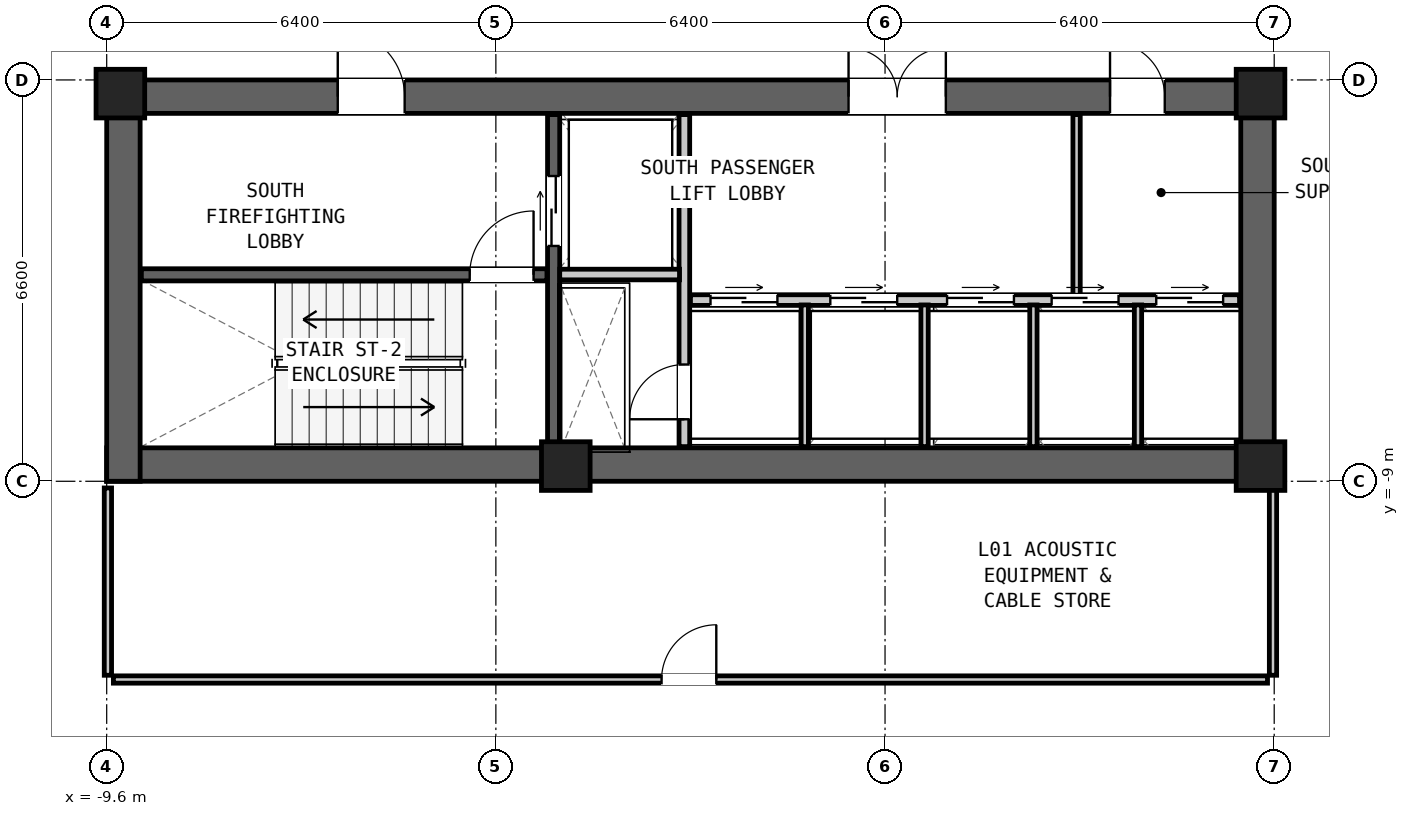
"""IFC4 building model, lengths in metres.
Left out: names, types, materials, properties, quantities, classifications, styles, units other than length and angle.
Written with IfcOpenShell. Run it as: python <this file> out.ifc"""

import sys

from ifc_helpers import new_model, si_unit, direction, frame, frame_2d, origin, origin_2d, place, context, subcontext, project, spatial, rectangle, extrude, element, fill, save


model = new_model("IFC4")
c1 = context("Model", 3, precision=1e-05, world=origin(), true_north=direction((0.0, 1.0)))
c2 = subcontext(c1, "Body", "Model", "MODEL_VIEW")
j1 = project(units=[si_unit("LENGTHUNIT", "METRE"), si_unit("PLANEANGLEUNIT", "RADIAN")], contexts=[c1])
p1 = place(None, origin())
s1 = spatial("IfcSite", under=j1, at=p1, CompositionType="ELEMENT")
p2 = place(p1, origin())
s2 = spatial("IfcBuilding", under=s1, at=p2, CompositionType="ELEMENT")
p3 = place(p2, frame((0.0, 0.0, 5.1)))
s3 = spatial("IfcBuildingStorey", under=s2, at=p3, CompositionType="ELEMENT", Elevation=5.1)
p4 = place(p3, frame((-9.6, -8.725, 0.0), z_axis=(0.0, 0.0, 1.0), x_axis=(1.0, 0.0, 0.0)))
e1 = element("IfcWall", 1, at=p4, inside=s3, PredefinedType="SHEAR", context=c2, shape_type="SweptSolid", body=[
    extrude(rectangle(XDim=19.2, YDim=0.55, at=frame_2d((9.6, 0.0))), origin(), (0.0, 0.0, 1.0), 4.2),
])
p5 = place(p3, frame((-9.6, -2.675, 0.0), z_axis=(0.0, 0.0, 1.0), x_axis=(1.0, 0.0, 0.0)))
e2 = element("IfcWall", 2, at=p5, inside=s3, PredefinedType="SHEAR", context=c2, shape_type="SweptSolid", body=[
    extrude(rectangle(XDim=19.2, YDim=0.55, at=frame_2d((9.6, 0.0))), origin(), (0.0, 0.0, 1.0), 4.2),
])
p6 = place(p5, frame((3.8, 0.0, 0.0)))
e3 = element("IfcOpeningElement", 3, at=p6, cuts=e2, PredefinedType="OPENING", context=c2, shape_type="SweptSolid", body=[
    extrude(rectangle(XDim=1.1, YDim=2.08, at=frame_2d((0.55, 1.04))), frame((0.0, 0.287, 0.0), z_axis=(0.0, -1.0, 0.0), x_axis=(1.0, 0.0, 0.0)), (0.0, 0.0, 1.0), 0.574),
])
p7 = place(p5, frame((12.2, 0.0, 0.0)))
e4 = element("IfcOpeningElement", 4, at=p7, cuts=e2, PredefinedType="OPENING", context=c2, shape_type="SweptSolid", body=[
    extrude(rectangle(XDim=1.6, YDim=2.12, at=frame_2d((0.8, 1.06))), frame((0.0, 0.287, 0.0), z_axis=(0.0, -1.0, 0.0), x_axis=(1.0, 0.0, 0.0)), (0.0, 0.0, 1.0), 0.574),
])
p8 = place(p5, frame((16.5, 0.0, 0.0)))
e5 = element("IfcOpeningElement", 5, at=p8, cuts=e2, PredefinedType="OPENING", context=c2, shape_type="SweptSolid", body=[
    extrude(rectangle(XDim=0.9, YDim=2.05, at=frame_2d((0.45, 1.025))), frame((0.0, 0.287, 0.0), z_axis=(0.0, -1.0, 0.0), x_axis=(1.0, 0.0, 0.0)), (0.0, 0.0, 1.0), 0.574),
])
for number, where, z_axis, x_axis in (
    (6, (-9.325, -9.0, 0.0), (0.0, 0.0, 1.0), (0.0, 1.0, 0.0)),
    (7, (9.325, -9.0, 0.0), (0.0, 0.0, 1.0), (0.0, 1.0, 0.0)),
):
    element("IfcWall", number, at=place(p3, frame(where, z_axis=z_axis, x_axis=x_axis)), inside=s3, PredefinedType="SHEAR", context=c2, shape_type="SweptSolid", body=[
        extrude(rectangle(XDim=6.6, YDim=0.55, at=frame_2d((3.3, 0.0))), origin(), (0.0, 0.0, 1.0), 4.2),
    ])
for number, where, z_axis, x_axis in (
    (8, (-9.375, -2.625, 0.0), (0.0, 0.0, 1.0), (1.0, 0.0, 0.0)),
    (9, (9.375, -2.625, 0.0), (0.0, 0.0, 1.0), (1.0, 0.0, 0.0)),
    (10, (-2.05, -8.75, 0.0), (0.0, 0.0, 1.0), (1.0, 0.0, 0.0)),
    (11, (9.375, -8.75, 0.0), (0.0, 0.0, 1.0), (1.0, 0.0, 0.0)),
):
    element("IfcColumn", number, at=place(p3, frame(where, z_axis=z_axis, x_axis=x_axis)), inside=s3, PredefinedType="COLUMN", context=c2, shape_type="SweptSolid", body=[
        extrude(rectangle(XDim=0.8, YDim=0.8, at=origin_2d()), origin(), (0.0, 0.0, 1.0), 4.2),
    ])
p9 = place(p3, frame((-9.03, -5.605, 0.0), z_axis=(0.0, 0.0, 1.0), x_axis=(1.0, 0.0, 0.0)))
e12 = element("IfcWall", 12, at=p9, inside=s3, PredefinedType="SHEAR", context=c2, shape_type="SweptSolid", body=[
    extrude(rectangle(XDim=6.67, YDim=0.2, at=frame_2d((3.335, 0.0))), origin(), (0.0, 0.0, 1.0), 3.88),
])
p10 = place(p9, frame((5.4, 0.0, 0.0)))
e13 = element("IfcOpeningElement", 13, at=p10, cuts=e12, PredefinedType="OPENING", context=c2, shape_type="SweptSolid", body=[
    extrude(rectangle(XDim=1.05, YDim=2.08, at=frame_2d((0.525, 1.04))), frame((0.0, 0.112, 0.0), z_axis=(0.0, -1.0, 0.0), x_axis=(1.0, 0.0, 0.0)), (0.0, 0.0, 1.0), 0.224),
])
p11 = place(p3, frame((-2.25, -8.43, 0.0), z_axis=(0.0, 0.0, 1.0), x_axis=(0.0, 1.0, 0.0)))
e14 = element("IfcWall", 14, at=p11, inside=s3, PredefinedType="SHEAR", context=c2, shape_type="SweptSolid", body=[
    extrude(rectangle(XDim=5.46, YDim=0.2, at=frame_2d((2.73, 0.0))), origin(), (0.0, 0.0, 1.0), 3.88),
])
p12 = place(p11, frame((3.3, 0.0, 0.0)))
e15 = element("IfcOpeningElement", 15, at=p12, cuts=e14, PredefinedType="OPENING", context=c2, shape_type="SweptSolid", body=[
    extrude(rectangle(XDim=1.15, YDim=2.08, at=frame_2d((0.575, 1.04))), frame((0.0, 0.112, 0.0), z_axis=(0.0, -1.0, 0.0), x_axis=(1.0, 0.0, 0.0)), (0.0, 0.0, 1.0), 0.224),
])
p13 = place(p3, frame((-0.1, -8.43, 0.0), z_axis=(0.0, 0.0, 1.0), x_axis=(0.0, 1.0, 0.0)))
e16 = element("IfcWall", 16, at=p13, inside=s3, PredefinedType="PARTITIONING", context=c2, shape_type="SweptSolid", body=[
    extrude(rectangle(XDim=5.46, YDim=0.175, at=frame_2d((2.73, 0.0))), origin(), (0.0, 0.0, 1.0), 3.88),
])
p14 = place(p13, frame((0.45, 0.0, 0.0)))
e17 = element("IfcOpeningElement", 17, at=p14, cuts=e16, PredefinedType="OPENING", context=c2, shape_type="SweptSolid", body=[
    extrude(rectangle(XDim=0.9, YDim=2.05, at=frame_2d((0.45, 1.025))), frame((0.0, 0.1, 0.0), z_axis=(0.0, -1.0, 0.0), x_axis=(1.0, 0.0, 0.0)), (0.0, 0.0, 1.0), 0.199),
])
p15 = place(p3, frame((-2.15, -5.6, 0.0), z_axis=(0.0, 0.0, 1.0), x_axis=(1.0, 0.0, 0.0)))
e18 = element("IfcWall", 18, at=p15, inside=s3, PredefinedType="PARTITIONING", context=c2, shape_type="SweptSolid", body=[
    extrude(rectangle(XDim=1.97, YDim=0.175, at=frame_2d((0.985, 0.0))), origin(), (0.0, 0.0, 1.0), 3.88),
])
p16 = place(p3, frame((0.0, -6.02, 0.0), z_axis=(0.0, 0.0, 1.0), x_axis=(1.0, 0.0, 0.0)))
e19 = element("IfcWall", 19, at=p16, inside=s3, PredefinedType="PARTITIONING", context=c2, shape_type="SweptSolid", body=[
    extrude(rectangle(XDim=9.03, YDim=0.175, at=frame_2d((4.515, 0.0))), origin(), (0.0, 0.0, 1.0), 3.88),
])
p17 = place(p16, frame((0.33, 0.0, 0.0)))
e20 = element("IfcOpeningElement", 20, at=p17, cuts=e19, PredefinedType="OPENING", context=c2, shape_type="SweptSolid", body=[
    extrude(rectangle(XDim=1.1, YDim=2.06, at=frame_2d((0.55, 1.03))), frame((0.0, 0.1, 0.0), z_axis=(0.0, -1.0, 0.0), x_axis=(1.0, 0.0, 0.0)), (0.0, 0.0, 1.0), 0.199),
])
p18 = place(p16, frame((2.3, 0.0, 0.0)))
e21 = element("IfcOpeningElement", 21, at=p18, cuts=e19, PredefinedType="OPENING", context=c2, shape_type="SweptSolid", body=[
    extrude(rectangle(XDim=1.1, YDim=2.06, at=frame_2d((0.55, 1.03))), frame((0.0, 0.1, 0.0), z_axis=(0.0, -1.0, 0.0), x_axis=(1.0, 0.0, 0.0)), (0.0, 0.0, 1.0), 0.199),
])
p19 = place(p16, frame((4.22, 0.0, 0.0)))
e22 = element("IfcOpeningElement", 22, at=p19, cuts=e19, PredefinedType="OPENING", context=c2, shape_type="SweptSolid", body=[
    extrude(rectangle(XDim=1.1, YDim=2.06, at=frame_2d((0.55, 1.03))), frame((0.0, 0.1, 0.0), z_axis=(0.0, -1.0, 0.0), x_axis=(1.0, 0.0, 0.0)), (0.0, 0.0, 1.0), 0.199),
])
p20 = place(p16, frame((5.94, 0.0, 0.0)))
e23 = element("IfcOpeningElement", 23, at=p20, cuts=e19, PredefinedType="OPENING", context=c2, shape_type="SweptSolid", body=[
    extrude(rectangle(XDim=1.1, YDim=2.06, at=frame_2d((0.55, 1.03))), frame((0.0, 0.1, 0.0), z_axis=(0.0, -1.0, 0.0), x_axis=(1.0, 0.0, 0.0)), (0.0, 0.0, 1.0), 0.199),
])
p21 = place(p16, frame((7.66, 0.0, 0.0)))
e24 = element("IfcOpeningElement", 24, at=p21, cuts=e19, PredefinedType="OPENING", context=c2, shape_type="SweptSolid", body=[
    extrude(rectangle(XDim=1.1, YDim=2.06, at=frame_2d((0.55, 1.03))), frame((0.0, 0.1, 0.0), z_axis=(0.0, -1.0, 0.0), x_axis=(1.0, 0.0, 0.0)), (0.0, 0.0, 1.0), 0.199),
])
for number, where, z_axis, x_axis in (
    (25, (1.88, -8.43, 0.0), (0.0, 0.0, 1.0), (0.0, 1.0, 0.0)),
    (26, (3.85, -8.43, 0.0), (0.0, 0.0, 1.0), (0.0, 1.0, 0.0)),
    (27, (5.64, -8.43, 0.0), (0.0, 0.0, 1.0), (0.0, 1.0, 0.0)),
    (28, (7.36, -8.43, 0.0), (0.0, 0.0, 1.0), (0.0, 1.0, 0.0)),
):
    element("IfcWall", number, at=place(p3, frame(where, z_axis=z_axis, x_axis=x_axis)), inside=s3, PredefinedType="PARTITIONING", context=c2, shape_type="SweptSolid", body=[
        extrude(rectangle(XDim=2.33, YDim=0.12, at=frame_2d((1.165, 0.0))), origin(), (0.0, 0.0, 1.0), 3.88),
    ])
p22 = place(p3, frame((6.35, -5.94, 0.0), z_axis=(0.0, 0.0, 1.0), x_axis=(0.0, 1.0, 0.0)))
e29 = element("IfcWall", 29, at=p22, inside=s3, PredefinedType="PARTITIONING", context=c2, shape_type="SweptSolid", body=[
    extrude(rectangle(XDim=2.97, YDim=0.12, at=frame_2d((1.485, 0.0))), origin(), (0.0, 0.0, 1.0), 3.88),
])
p23 = place(p3, frame((-9.49, -12.26, 0.0), z_axis=(0.0, 0.0, 1.0), x_axis=(1.0, 0.0, 0.0)))
e30 = element("IfcWall", 30, at=p23, inside=s3, PredefinedType="PARTITIONING", context=c2, shape_type="SweptSolid", body=[
    extrude(rectangle(XDim=18.98, YDim=0.12, at=frame_2d((9.49, 0.0))), origin(), (0.0, 0.0, 1.0), 3.88),
])
p24 = place(p23, frame((9.015, 0.0, 0.0)))
e31 = element("IfcOpeningElement", 31, at=p24, cuts=e30, PredefinedType="OPENING", context=c2, shape_type="SweptSolid", body=[
    extrude(rectangle(XDim=0.9, YDim=2.05, at=frame_2d((0.45, 1.025))), frame((0.0, 0.072, 0.0), z_axis=(0.0, -1.0, 0.0), x_axis=(1.0, 0.0, 0.0)), (0.0, 0.0, 1.0), 0.144),
])
for number, where, z_axis, x_axis in (
    (32, (-9.58, -12.19, 0.0), (0.0, 0.0, 1.0), (0.0, 1.0, 0.0)),
    (33, (9.58, -12.19, 0.0), (0.0, 0.0, 1.0), (0.0, 1.0, 0.0)),
):
    element("IfcWall", number, at=place(p3, frame(where, z_axis=z_axis, x_axis=x_axis)), inside=s3, PredefinedType="PARTITIONING", context=c2, shape_type="SweptSolid", body=[
        extrude(rectangle(XDim=3.08, YDim=0.12, at=frame_2d((1.54, 0.0))), origin(), (0.0, 0.0, 1.0), 3.88),
    ])
p25 = place(p10, origin())
e34 = element("IfcDoor", 34, at=p25, inside=s3, OperationType="SINGLE_SWING_RIGHT", PredefinedType="DOOR", context=c2, shape_type="SweptSolid", body=[
    extrude(rectangle(XDim=1.05, YDim=2.08, at=frame_2d((0.525, 1.04))), frame((0.0, 0.025, 0.0), z_axis=(0.0, -1.0, 0.0), x_axis=(1.0, 0.0, 0.0)), (0.0, 0.0, 1.0), 0.05),
])
fill(e13, e34)
p26 = place(p6, origin())
e35 = element("IfcDoor", 35, at=p26, inside=s3, OperationType="SINGLE_SWING_LEFT", PredefinedType="DOOR", context=c2, shape_type="SweptSolid", body=[
    extrude(rectangle(XDim=1.1, YDim=2.08, at=frame_2d((0.55, 1.04))), frame((0.0, 0.025, 0.0), z_axis=(0.0, -1.0, 0.0), x_axis=(1.0, 0.0, 0.0)), (0.0, 0.0, 1.0), 0.05),
])
fill(e3, e35)
p27 = place(p12, origin())
e36 = element("IfcDoor", 36, at=p27, inside=s3, OperationType="DOUBLE_DOOR_SLIDING", PredefinedType="DOOR", context=c2, shape_type="SweptSolid", body=[
    extrude(rectangle(XDim=1.15, YDim=2.08, at=frame_2d((0.575, 1.04))), frame((0.0, 0.025, 0.0), z_axis=(0.0, -1.0, 0.0), x_axis=(1.0, 0.0, 0.0)), (0.0, 0.0, 1.0), 0.05),
])
fill(e15, e36)
p28 = place(p14, origin())
e37 = element("IfcDoor", 37, at=p28, inside=s3, OperationType="SINGLE_SWING_LEFT", PredefinedType="DOOR", context=c2, shape_type="SweptSolid", body=[
    extrude(rectangle(XDim=0.9, YDim=2.05, at=frame_2d((0.45, 1.025))), frame((0.0, 0.025, 0.0), z_axis=(0.0, -1.0, 0.0), x_axis=(1.0, 0.0, 0.0)), (0.0, 0.0, 1.0), 0.05),
])
fill(e17, e37)
p29 = place(p7, origin())
e38 = element("IfcDoor", 38, at=p29, inside=s3, OperationType="DOUBLE_DOOR_SINGLE_SWING", PredefinedType="DOOR", context=c2, shape_type="SweptSolid", body=[
    extrude(rectangle(XDim=1.6, YDim=2.12, at=frame_2d((0.8, 1.06))), frame((0.0, 0.025, 0.0), z_axis=(0.0, -1.0, 0.0), x_axis=(1.0, 0.0, 0.0)), (0.0, 0.0, 1.0), 0.05),
])
fill(e4, e38)
p30 = place(p8, origin())
e39 = element("IfcDoor", 39, at=p30, inside=s3, OperationType="SINGLE_SWING_LEFT", PredefinedType="DOOR", context=c2, shape_type="SweptSolid", body=[
    extrude(rectangle(XDim=0.9, YDim=2.05, at=frame_2d((0.45, 1.025))), frame((0.0, 0.025, 0.0), z_axis=(0.0, -1.0, 0.0), x_axis=(1.0, 0.0, 0.0)), (0.0, 0.0, 1.0), 0.05),
])
fill(e5, e39)
p31 = place(p24, origin())
e40 = element("IfcDoor", 40, at=p31, inside=s3, OperationType="SINGLE_SWING_RIGHT", PredefinedType="DOOR", context=c2, shape_type="SweptSolid", body=[
    extrude(rectangle(XDim=0.9, YDim=2.05, at=frame_2d((0.45, 1.025))), frame((0.0, 0.025, 0.0), z_axis=(0.0, -1.0, 0.0), x_axis=(1.0, 0.0, 0.0)), (0.0, 0.0, 1.0), 0.05),
])
fill(e31, e40)
p32 = place(p17, origin())
e41 = element("IfcDoor", 41, at=p32, inside=s3, OperationType="DOUBLE_DOOR_SLIDING", PredefinedType="DOOR", context=c2, shape_type="SweptSolid", body=[
    extrude(rectangle(XDim=1.1, YDim=2.06, at=frame_2d((0.55, 1.03))), frame((0.0, 0.025, 0.0), z_axis=(0.0, -1.0, 0.0), x_axis=(1.0, 0.0, 0.0)), (0.0, 0.0, 1.0), 0.05),
])
fill(e20, e41)
p33 = place(p18, origin())
e42 = element("IfcDoor", 42, at=p33, inside=s3, OperationType="DOUBLE_DOOR_SLIDING", PredefinedType="DOOR", context=c2, shape_type="SweptSolid", body=[
    extrude(rectangle(XDim=1.1, YDim=2.06, at=frame_2d((0.55, 1.03))), frame((0.0, 0.025, 0.0), z_axis=(0.0, -1.0, 0.0), x_axis=(1.0, 0.0, 0.0)), (0.0, 0.0, 1.0), 0.05),
])
fill(e21, e42)
p34 = place(p19, origin())
e43 = element("IfcDoor", 43, at=p34, inside=s3, OperationType="DOUBLE_DOOR_SLIDING", PredefinedType="DOOR", context=c2, shape_type="SweptSolid", body=[
    extrude(rectangle(XDim=1.1, YDim=2.06, at=frame_2d((0.55, 1.03))), frame((0.0, 0.025, 0.0), z_axis=(0.0, -1.0, 0.0), x_axis=(1.0, 0.0, 0.0)), (0.0, 0.0, 1.0), 0.05),
])
fill(e22, e43)
p35 = place(p20, origin())
e44 = element("IfcDoor", 44, at=p35, inside=s3, OperationType="DOUBLE_DOOR_SLIDING", PredefinedType="DOOR", context=c2, shape_type="SweptSolid", body=[
    extrude(rectangle(XDim=1.1, YDim=2.06, at=frame_2d((0.55, 1.03))), frame((0.0, 0.025, 0.0), z_axis=(0.0, -1.0, 0.0), x_axis=(1.0, 0.0, 0.0)), (0.0, 0.0, 1.0), 0.05),
])
fill(e23, e44)
p36 = place(p21, origin())
e45 = element("IfcDoor", 45, at=p36, inside=s3, OperationType="DOUBLE_DOOR_SLIDING", PredefinedType="DOOR", context=c2, shape_type="SweptSolid", body=[
    extrude(rectangle(XDim=1.1, YDim=2.06, at=frame_2d((0.55, 1.03))), frame((0.0, 0.025, 0.0), z_axis=(0.0, -1.0, 0.0), x_axis=(1.0, 0.0, 0.0)), (0.0, 0.0, 1.0), 0.05),
])
fill(e24, e45)
save(model, sys.argv[1])
